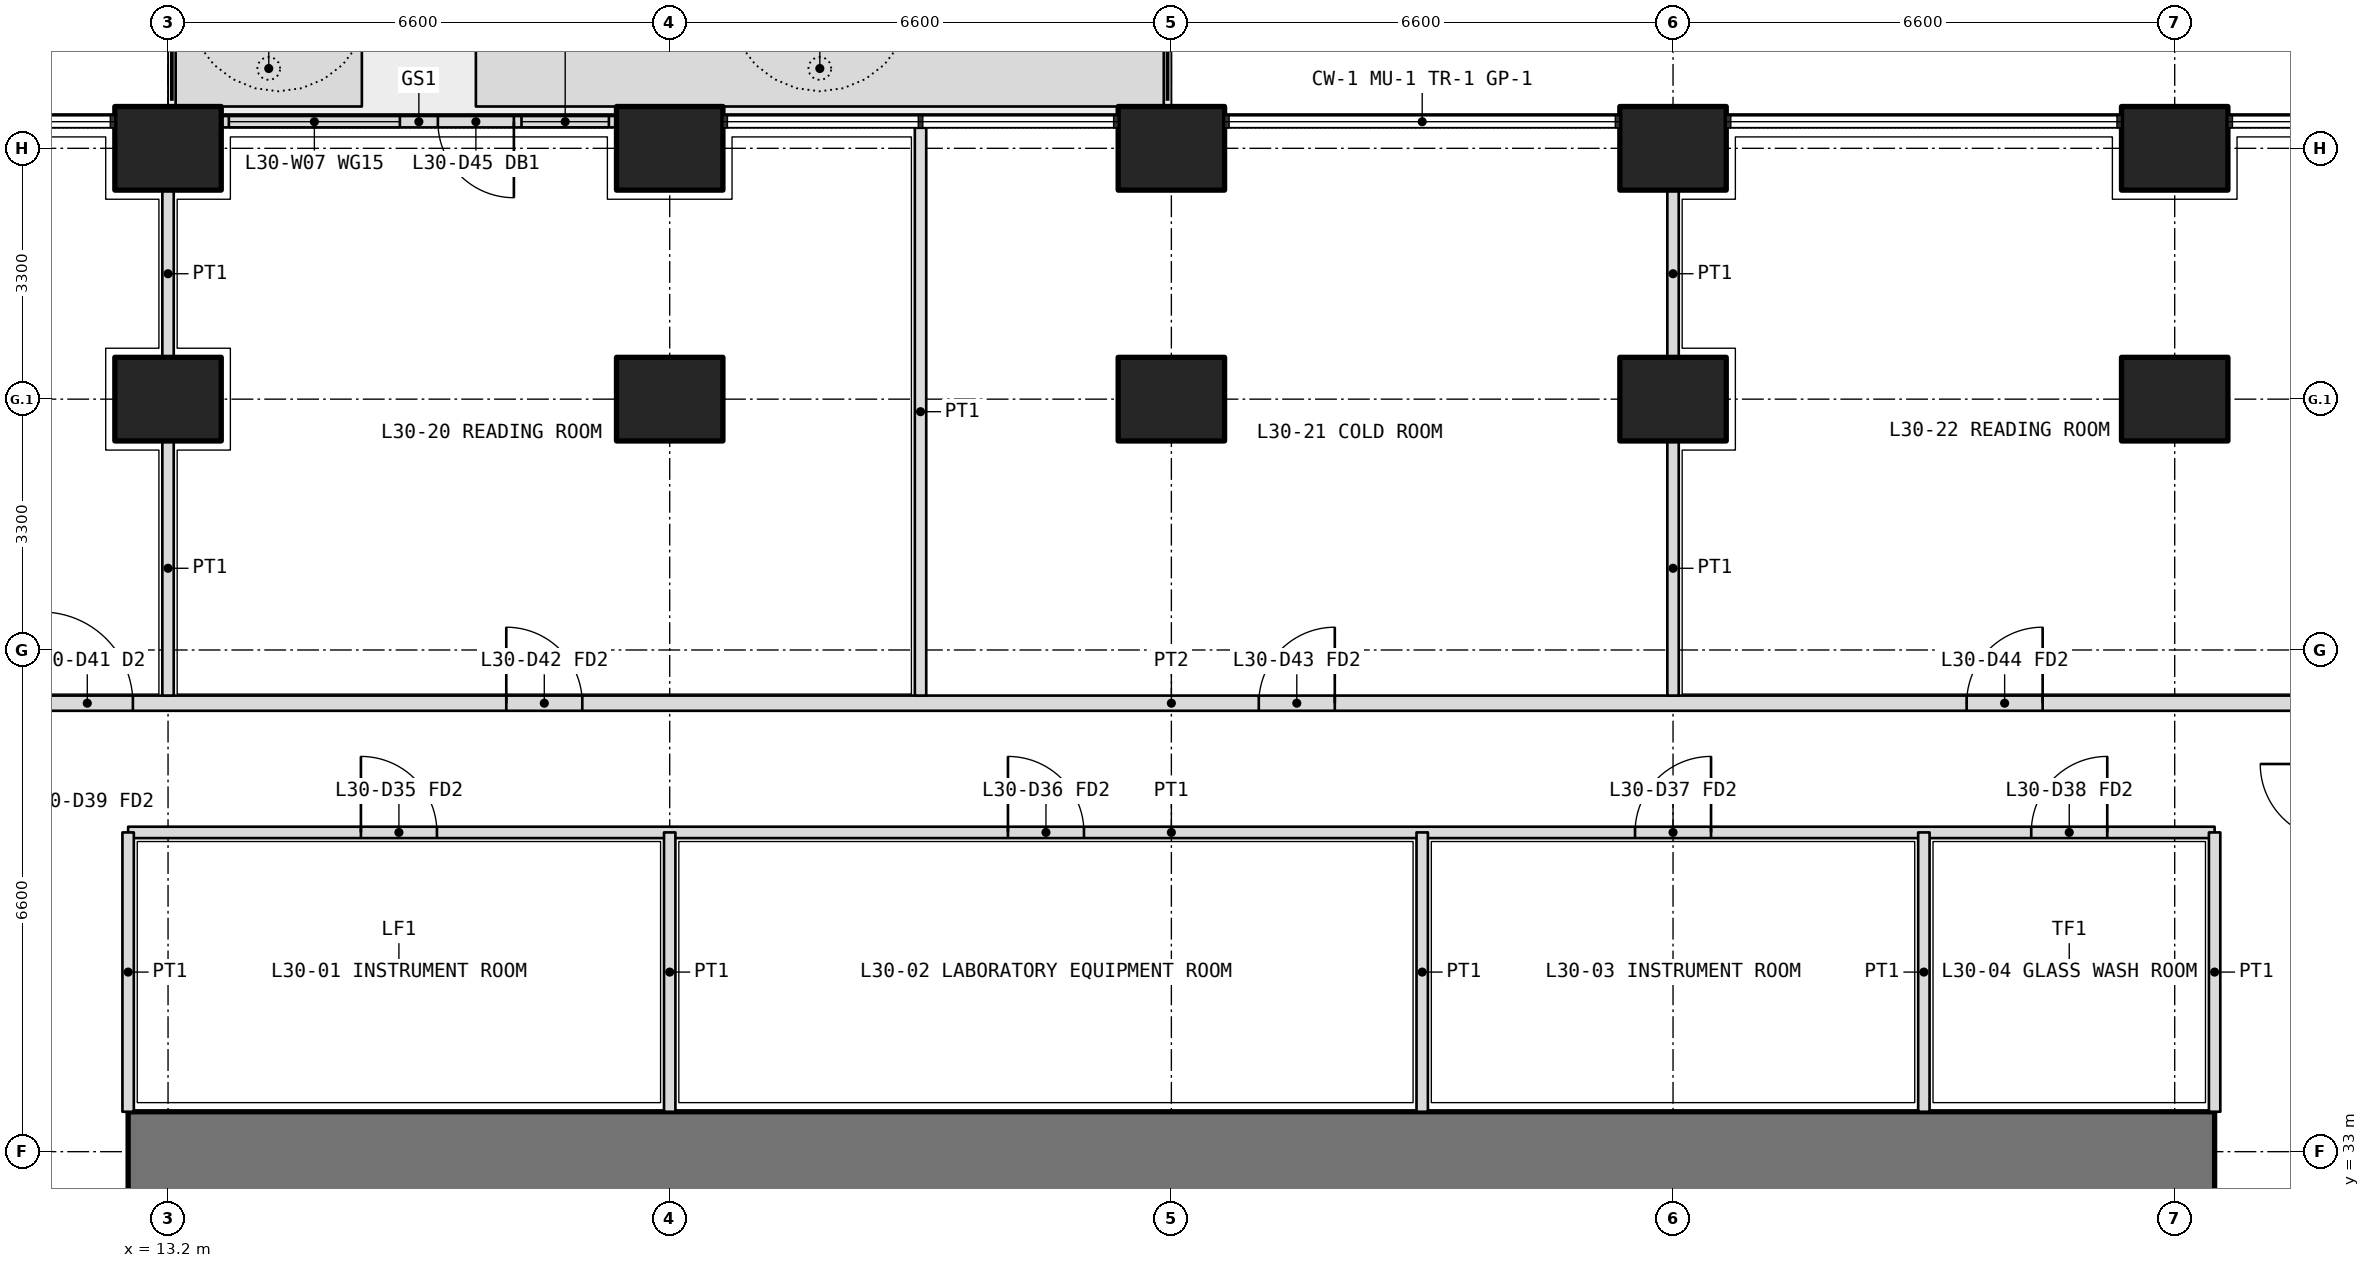
"""IFC4 building model, lengths in metres.
Left out: names, types, materials, properties, quantities, classifications, styles, units other than length and angle.
Written with IfcOpenShell. Run it as: python <this file> out.ifc"""

import sys

from ifc_helpers import new_model, si_unit, direction, frame, frame_2d, origin, origin_2d, place, context, subcontext, project, spatial, polyline, rectangle, outline, extrude, element, fill, save


model = new_model("IFC4")
c1 = context("Model", 3, precision=1e-05, world=origin(), true_north=direction((0.0, 1.0)))
c2 = subcontext(c1, "Body", "Model", "MODEL_VIEW")
j1 = project(units=[si_unit("LENGTHUNIT", "METRE"), si_unit("PLANEANGLEUNIT", "RADIAN")], contexts=[c1])
p1 = place(None, origin())
s1 = spatial("IfcSite", under=j1, at=p1, CompositionType="ELEMENT")
p2 = place(p1, origin())
s2 = spatial("IfcBuilding", under=s1, at=p2, CompositionType="ELEMENT")
p3 = place(p2, frame((0.0, 0.0, 132.6)))
s3 = spatial("IfcBuildingStorey", under=s2, at=p3, CompositionType="ELEMENT", Elevation=132.6)
for number, where, z_axis, x_axis in (
    (1, (13.2, 46.2, 0.0), (0.0, 0.0, 1.0), (1.0, 0.0, 0.0)),
    (2, (19.8, 46.2, 0.0), (0.0, 0.0, 1.0), (1.0, 0.0, 0.0)),
    (3, (26.4, 46.2, 0.0), (0.0, 0.0, 1.0), (1.0, 0.0, 0.0)),
    (4, (33.0, 46.2, 0.0), (0.0, 0.0, 1.0), (1.0, 0.0, 0.0)),
    (5, (39.6, 46.2, 0.0), (0.0, 0.0, 1.0), (1.0, 0.0, 0.0)),
    (6, (13.2, 42.9, 0.0), (0.0, 0.0, 1.0), (1.0, 0.0, 0.0)),
    (7, (19.8, 42.9, 0.0), (0.0, 0.0, 1.0), (1.0, 0.0, 0.0)),
    (8, (26.4, 42.9, 0.0), (0.0, 0.0, 1.0), (1.0, 0.0, 0.0)),
    (9, (33.0, 42.9, 0.0), (0.0, 0.0, 1.0), (1.0, 0.0, 0.0)),
    (10, (39.6, 42.9, 0.0), (0.0, 0.0, 1.0), (1.0, 0.0, 0.0)),
):
    element("IfcColumn", number, at=place(p3, frame(where, z_axis=z_axis, x_axis=x_axis)), inside=s3, PredefinedType="COLUMN", context=c2, shape_type="SweptSolid", body=[
        extrude(rectangle(XDim=1.4, YDim=1.1, at=origin_2d()), origin(), (0.0, 0.0, 1.0), 4.2),
    ])
p4 = place(p3, origin())
e11 = element("IfcWall", 11, at=p4, inside=s3, PredefinedType="USERDEFINED", context=c2, shape_type="SweptSolid", body=[
    extrude(outline(polyline([(13.3, 46.75), (15.75, 46.75), (15.75, 47.75), (13.3, 47.75), (13.3, 46.75)]), holes=[polyline([(13.45, 46.9), (15.6, 46.9), (15.6, 47.6), (13.45, 47.6), (13.45, 46.9)])]), origin(), (0.0, 0.0, 1.0), 1.05),
])
p5 = place(p3, origin())
e12 = element("IfcWall", 12, at=p5, inside=s3, PredefinedType="USERDEFINED", context=c2, shape_type="SweptSolid", body=[
    extrude(outline(polyline([(17.25, 46.75), (26.3, 46.75), (26.3, 47.75), (17.25, 47.75), (17.25, 46.75)]), holes=[polyline([(17.4, 46.9), (26.15, 46.9), (26.15, 47.6), (17.4, 47.6), (17.4, 46.9)])]), origin(), (0.0, 0.0, 1.0), 1.05),
])
p6 = place(p3, frame((19.1, 46.55, 0.0), z_axis=(0.0, 0.0, 1.0), x_axis=(-1.0, 0.0, 0.0)))
e13 = element("IfcWall", 13, at=p6, inside=s3, PredefinedType="SOLIDWALL", context=c2, shape_type="SweptSolid", body=[
    extrude(rectangle(XDim=5.2, YDim=0.15, at=frame_2d((2.6, 0.0))), origin(), (0.0, 0.0, 1.0), 2.7),
])
p7 = place(p6, frame((1.35, 0.0, 0.0)))
e14 = element("IfcOpeningElement", 14, at=p7, cuts=e13, PredefinedType="OPENING", context=c2, shape_type="SweptSolid", body=[
    extrude(rectangle(XDim=1.0, YDim=2.4, at=frame_2d((0.5, 1.2))), frame((0.0, 0.085, 0.0), z_axis=(0.0, -1.0, 0.0), x_axis=(1.0, 0.0, 0.0)), (0.0, 0.0, 1.0), 0.17),
])
p8 = place(p6, frame((0.1, 0.0, 0.1)))
e15 = element("IfcOpeningElement", 15, at=p8, cuts=e13, PredefinedType="OPENING", context=c2, shape_type="SweptSolid", body=[
    extrude(rectangle(XDim=1.15, YDim=2.3, at=frame_2d((0.575, 1.15))), frame((0.0, 0.085, 0.0), z_axis=(0.0, -1.0, 0.0), x_axis=(1.0, 0.0, 0.0)), (0.0, 0.0, 1.0), 0.17),
])
p9 = place(p6, frame((2.85, 0.0, 0.1)))
e16 = element("IfcOpeningElement", 16, at=p9, cuts=e13, PredefinedType="OPENING", context=c2, shape_type="SweptSolid", body=[
    extrude(rectangle(XDim=2.25, YDim=2.3, at=frame_2d((1.125, 1.15))), frame((0.0, 0.085, 0.0), z_axis=(0.0, -1.0, 0.0), x_axis=(1.0, 0.0, 0.0)), (0.0, 0.0, 1.0), 0.17),
])
p10 = place(p3, frame((40.125, 33.0, 0.0), z_axis=(0.0, 0.0, 1.0), x_axis=(-1.0, 0.0, 0.0)))
e17 = element("IfcWall", 17, at=p10, inside=s3, PredefinedType="SHEAR", context=c2, shape_type="SweptSolid", body=[
    extrude(rectangle(XDim=27.45, YDim=1.05, at=frame_2d((13.725, 0.0))), origin(), (0.0, 0.0, 1.0), 4.2),
])
p11 = place(p3, frame((12.675, 37.2, 0.0), z_axis=(0.0, 0.0, 1.0), x_axis=(1.0, 0.0, 0.0)))
e18 = element("IfcWall", 18, at=p11, inside=s3, PredefinedType="PARTITIONING", context=c2, shape_type="SweptSolid", body=[
    extrude(rectangle(XDim=27.45, YDim=0.15, at=frame_2d((13.725, 0.0))), origin(), (0.0, 0.0, 1.0), 2.85),
])
p12 = place(p11, frame((3.062, 0.0, 0.0)))
e19 = element("IfcOpeningElement", 19, at=p12, cuts=e18, PredefinedType="OPENING", context=c2, shape_type="SweptSolid", body=[
    extrude(rectangle(XDim=1.0, YDim=2.1, at=frame_2d((0.5, 1.05))), frame((0.0, 0.085, 0.0), z_axis=(0.0, -1.0, 0.0), x_axis=(1.0, 0.0, 0.0)), (0.0, 0.0, 1.0), 0.17),
])
p13 = place(p11, frame((11.575, 0.0, 0.0)))
e20 = element("IfcOpeningElement", 20, at=p13, cuts=e18, PredefinedType="OPENING", context=c2, shape_type="SweptSolid", body=[
    extrude(rectangle(XDim=1.0, YDim=2.1, at=frame_2d((0.5, 1.05))), frame((0.0, 0.085, 0.0), z_axis=(0.0, -1.0, 0.0), x_axis=(1.0, 0.0, 0.0)), (0.0, 0.0, 1.0), 0.17),
])
p14 = place(p11, frame((19.825, 0.0, 0.0)))
e21 = element("IfcOpeningElement", 21, at=p14, cuts=e18, PredefinedType="OPENING", context=c2, shape_type="SweptSolid", body=[
    extrude(rectangle(XDim=1.0, YDim=2.1, at=frame_2d((0.5, 1.05))), frame((0.0, 0.085, 0.0), z_axis=(0.0, -1.0, 0.0), x_axis=(1.0, 0.0, 0.0)), (0.0, 0.0, 1.0), 0.17),
])
p15 = place(p11, frame((25.038, 0.0, 0.0)))
e22 = element("IfcOpeningElement", 22, at=p15, cuts=e18, PredefinedType="OPENING", context=c2, shape_type="SweptSolid", body=[
    extrude(rectangle(XDim=1.0, YDim=2.1, at=frame_2d((0.5, 1.05))), frame((0.0, 0.085, 0.0), z_axis=(0.0, -1.0, 0.0), x_axis=(1.0, 0.0, 0.0)), (0.0, 0.0, 1.0), 0.17),
])
for number, where, z_axis, x_axis in (
    (23, (12.675, 33.525, 0.0), (0.0, 0.0, 1.0), (0.0, 1.0, 0.0)),
    (24, (40.125, 33.525, 0.0), (0.0, 0.0, 1.0), (0.0, 1.0, 0.0)),
    (25, (19.8, 33.525, 0.0), (0.0, 0.0, 1.0), (0.0, 1.0, 0.0)),
):
    element("IfcWall", number, at=place(p3, frame(where, z_axis=z_axis, x_axis=x_axis)), inside=s3, PredefinedType="PARTITIONING", context=c2, shape_type="SweptSolid", body=[
        extrude(rectangle(XDim=3.675, YDim=0.15, at=frame_2d((1.837, 0.0))), origin(), (0.0, 0.0, 1.0), 2.85),
    ])
for number, where, z_axis, x_axis in (
    (26, (29.7, 33.525, 0.0), (0.0, 0.0, 1.0), (0.0, 1.0, 0.0)),
    (27, (36.3, 33.525, 0.0), (0.0, 0.0, 1.0), (0.0, 1.0, 0.0)),
):
    element("IfcWall", number, at=place(p3, frame(where, z_axis=z_axis, x_axis=x_axis)), inside=s3, PredefinedType="PARTITIONING", context=c2, shape_type="SweptSolid", body=[
        extrude(rectangle(XDim=3.675, YDim=0.15, at=frame_2d((1.837, 0.0))), origin(), (0.0, 0.0, 1.0), 3.9),
    ])
p16 = place(p3, frame((10.975, 38.9, 0.0), z_axis=(0.0, 0.0, 1.0), x_axis=(1.0, 0.0, 0.0)))
e28 = element("IfcWall", 28, at=p16, inside=s3, PredefinedType="PARTITIONING", context=c2, shape_type="SweptSolid", body=[
    extrude(rectangle(XDim=30.85, YDim=0.2, at=frame_2d((15.425, 0.0))), origin(), (0.0, 0.0, 1.0), 2.85),
])
p17 = place(p16, frame((0.562, 0.0, 0.0)))
e29 = element("IfcOpeningElement", 29, at=p17, cuts=e28, PredefinedType="OPENING", context=c2, shape_type="SweptSolid", body=[
    extrude(rectangle(XDim=1.2, YDim=2.1, at=frame_2d((0.6, 1.05))), frame((0.0, 0.11, 0.0), z_axis=(0.0, -1.0, 0.0), x_axis=(1.0, 0.0, 0.0)), (0.0, 0.0, 1.0), 0.22),
])
p18 = place(p16, frame((6.675, 0.0, 0.0)))
e30 = element("IfcOpeningElement", 30, at=p18, cuts=e28, PredefinedType="OPENING", context=c2, shape_type="SweptSolid", body=[
    extrude(rectangle(XDim=1.0, YDim=2.1, at=frame_2d((0.5, 1.05))), frame((0.0, 0.11, 0.0), z_axis=(0.0, -1.0, 0.0), x_axis=(1.0, 0.0, 0.0)), (0.0, 0.0, 1.0), 0.22),
])
p19 = place(p16, frame((16.575, 0.0, 0.0)))
e31 = element("IfcOpeningElement", 31, at=p19, cuts=e28, PredefinedType="OPENING", context=c2, shape_type="SweptSolid", body=[
    extrude(rectangle(XDim=1.0, YDim=2.1, at=frame_2d((0.5, 1.05))), frame((0.0, 0.11, 0.0), z_axis=(0.0, -1.0, 0.0), x_axis=(1.0, 0.0, 0.0)), (0.0, 0.0, 1.0), 0.22),
])
p20 = place(p16, frame((25.887, 0.0, 0.0)))
e32 = element("IfcOpeningElement", 32, at=p20, cuts=e28, PredefinedType="OPENING", context=c2, shape_type="SweptSolid", body=[
    extrude(rectangle(XDim=1.0, YDim=2.1, at=frame_2d((0.5, 1.05))), frame((0.0, 0.11, 0.0), z_axis=(0.0, -1.0, 0.0), x_axis=(1.0, 0.0, 0.0)), (0.0, 0.0, 1.0), 0.22),
])
p21 = place(p3, frame((13.2, 45.65, 0.0), z_axis=(0.0, 0.0, 1.0), x_axis=(0.0, -1.0, 0.0)))
e33 = element("IfcWall", 33, at=p21, inside=s3, PredefinedType="PARTITIONING", context=c2, shape_type="SweptSolid", body=[
    extrude(rectangle(XDim=2.2, YDim=0.15, at=frame_2d((1.1, 0.0))), origin(), (0.0, 0.0, 1.0), 2.85),
])
p22 = place(p3, frame((13.2, 42.35, 0.0), z_axis=(0.0, 0.0, 1.0), x_axis=(0.0, -1.0, 0.0)))
e34 = element("IfcWall", 34, at=p22, inside=s3, PredefinedType="PARTITIONING", context=c2, shape_type="SweptSolid", body=[
    extrude(rectangle(XDim=3.35, YDim=0.15, at=frame_2d((1.675, 0.0))), origin(), (0.0, 0.0, 1.0), 2.85),
])
p23 = place(p3, frame((23.1, 46.47, 0.0), z_axis=(0.0, 0.0, 1.0), x_axis=(0.0, -1.0, 0.0)))
e35 = element("IfcWall", 35, at=p23, inside=s3, PredefinedType="PARTITIONING", context=c2, shape_type="SweptSolid", body=[
    extrude(rectangle(XDim=7.47, YDim=0.15, at=frame_2d((3.735, 0.0))), origin(), (0.0, 0.0, 1.0), 2.7),
])
p24 = place(p3, frame((33.0, 45.65, 0.0), z_axis=(0.0, 0.0, 1.0), x_axis=(0.0, -1.0, 0.0)))
e36 = element("IfcWall", 36, at=p24, inside=s3, PredefinedType="PARTITIONING", context=c2, shape_type="SweptSolid", body=[
    extrude(rectangle(XDim=2.2, YDim=0.15, at=frame_2d((1.1, 0.0))), origin(), (0.0, 0.0, 1.0), 2.85),
])
p25 = place(p3, frame((33.0, 42.35, 0.0), z_axis=(0.0, 0.0, 1.0), x_axis=(0.0, -1.0, 0.0)))
e37 = element("IfcWall", 37, at=p25, inside=s3, PredefinedType="PARTITIONING", context=c2, shape_type="SweptSolid", body=[
    extrude(rectangle(XDim=3.35, YDim=0.15, at=frame_2d((1.675, 0.0))), origin(), (0.0, 0.0, 1.0), 2.85),
])
p26 = place(p7, origin())
e38 = element("IfcDoor", 38, at=p26, inside=s3, OperationType="SINGLE_SWING_LEFT", PredefinedType="DOOR", context=c2, shape_type="SweptSolid", body=[
    extrude(rectangle(XDim=1.0, YDim=2.4, at=frame_2d((0.5, 1.2))), frame((0.0, 0.025, 0.0), z_axis=(0.0, -1.0, 0.0), x_axis=(1.0, 0.0, 0.0)), (0.0, 0.0, 1.0), 0.05),
])
fill(e14, e38)
p27 = place(p8, origin())
e39 = element("IfcWindow", 39, at=p27, inside=s3, PartitioningType="SINGLE_PANEL", PredefinedType="WINDOW", context=c2, shape_type="SweptSolid", body=[
    extrude(rectangle(XDim=1.15, YDim=2.3, at=frame_2d((0.575, 1.15))), frame((0.0, 0.03, 0.0), z_axis=(0.0, -1.0, 0.0), x_axis=(1.0, 0.0, 0.0)), (0.0, 0.0, 1.0), 0.06),
])
fill(e15, e39)
p28 = place(p9, origin())
e40 = element("IfcWindow", 40, at=p28, inside=s3, PartitioningType="SINGLE_PANEL", PredefinedType="WINDOW", context=c2, shape_type="SweptSolid", body=[
    extrude(rectangle(XDim=2.25, YDim=2.3, at=frame_2d((1.125, 1.15))), frame((0.0, 0.03, 0.0), z_axis=(0.0, -1.0, 0.0), x_axis=(1.0, 0.0, 0.0)), (0.0, 0.0, 1.0), 0.06),
])
fill(e16, e40)
p29 = place(p12, origin())
e41 = element("IfcDoor", 41, at=p29, inside=s3, OperationType="SINGLE_SWING_LEFT", PredefinedType="DOOR", context=c2, shape_type="SweptSolid", body=[
    extrude(rectangle(XDim=1.0, YDim=2.1, at=frame_2d((0.5, 1.05))), frame((0.0, 0.025, 0.0), z_axis=(0.0, -1.0, 0.0), x_axis=(1.0, 0.0, 0.0)), (0.0, 0.0, 1.0), 0.05),
])
fill(e19, e41)
p30 = place(p13, origin())
e42 = element("IfcDoor", 42, at=p30, inside=s3, OperationType="SINGLE_SWING_LEFT", PredefinedType="DOOR", context=c2, shape_type="SweptSolid", body=[
    extrude(rectangle(XDim=1.0, YDim=2.1, at=frame_2d((0.5, 1.05))), frame((0.0, 0.025, 0.0), z_axis=(0.0, -1.0, 0.0), x_axis=(1.0, 0.0, 0.0)), (0.0, 0.0, 1.0), 0.05),
])
fill(e20, e42)
p31 = place(p14, origin())
e43 = element("IfcDoor", 43, at=p31, inside=s3, OperationType="SINGLE_SWING_RIGHT", PredefinedType="DOOR", context=c2, shape_type="SweptSolid", body=[
    extrude(rectangle(XDim=1.0, YDim=2.1, at=frame_2d((0.5, 1.05))), frame((0.0, 0.025, 0.0), z_axis=(0.0, -1.0, 0.0), x_axis=(1.0, 0.0, 0.0)), (0.0, 0.0, 1.0), 0.05),
])
fill(e21, e43)
p32 = place(p15, origin())
e44 = element("IfcDoor", 44, at=p32, inside=s3, OperationType="SINGLE_SWING_RIGHT", PredefinedType="DOOR", context=c2, shape_type="SweptSolid", body=[
    extrude(rectangle(XDim=1.0, YDim=2.1, at=frame_2d((0.5, 1.05))), frame((0.0, 0.025, 0.0), z_axis=(0.0, -1.0, 0.0), x_axis=(1.0, 0.0, 0.0)), (0.0, 0.0, 1.0), 0.05),
])
fill(e22, e44)
p33 = place(p17, origin())
e45 = element("IfcDoor", 45, at=p33, inside=s3, OperationType="DOUBLE_DOOR_SINGLE_SWING", PredefinedType="DOOR", context=c2, shape_type="SweptSolid", body=[
    extrude(rectangle(XDim=1.2, YDim=2.1, at=frame_2d((0.6, 1.05))), frame((0.0, 0.025, 0.0), z_axis=(0.0, -1.0, 0.0), x_axis=(1.0, 0.0, 0.0)), (0.0, 0.0, 1.0), 0.05),
])
fill(e29, e45)
p34 = place(p18, origin())
e46 = element("IfcDoor", 46, at=p34, inside=s3, OperationType="SINGLE_SWING_LEFT", PredefinedType="DOOR", context=c2, shape_type="SweptSolid", body=[
    extrude(rectangle(XDim=1.0, YDim=2.1, at=frame_2d((0.5, 1.05))), frame((0.0, 0.025, 0.0), z_axis=(0.0, -1.0, 0.0), x_axis=(1.0, 0.0, 0.0)), (0.0, 0.0, 1.0), 0.05),
])
fill(e30, e46)
p35 = place(p19, origin())
e47 = element("IfcDoor", 47, at=p35, inside=s3, OperationType="SINGLE_SWING_RIGHT", PredefinedType="DOOR", context=c2, shape_type="SweptSolid", body=[
    extrude(rectangle(XDim=1.0, YDim=2.1, at=frame_2d((0.5, 1.05))), frame((0.0, 0.025, 0.0), z_axis=(0.0, -1.0, 0.0), x_axis=(1.0, 0.0, 0.0)), (0.0, 0.0, 1.0), 0.05),
])
fill(e31, e47)
p36 = place(p20, origin())
e48 = element("IfcDoor", 48, at=p36, inside=s3, OperationType="SINGLE_SWING_RIGHT", PredefinedType="DOOR", context=c2, shape_type="SweptSolid", body=[
    extrude(rectangle(XDim=1.0, YDim=2.1, at=frame_2d((0.5, 1.05))), frame((0.0, 0.025, 0.0), z_axis=(0.0, -1.0, 0.0), x_axis=(1.0, 0.0, 0.0)), (0.0, 0.0, 1.0), 0.05),
])
fill(e32, e48)
save(model, sys.argv[1])
